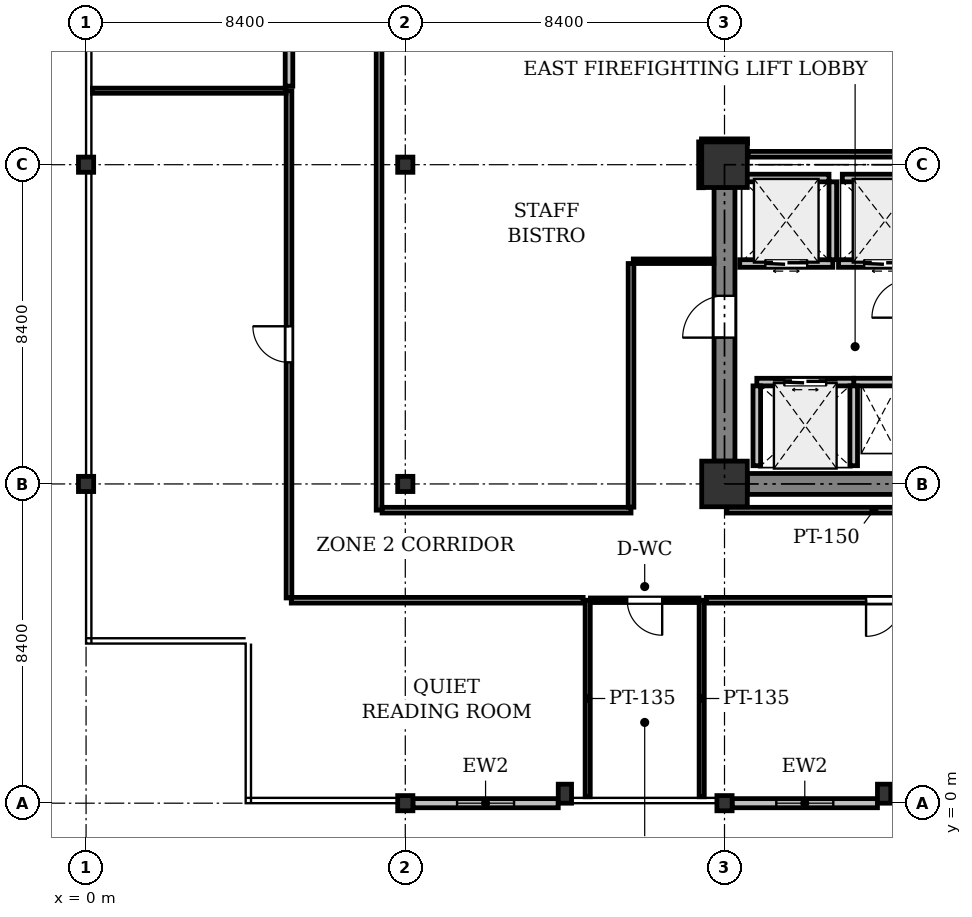
"""IFC4 building model, lengths in metres.
Left out: names, types, materials, properties, quantities, classifications, styles, units other than length and angle.
Written with IfcOpenShell. Run it as: python <this file> out.ifc"""

import sys

from ifc_helpers import new_model, si_unit, direction, frame, frame_2d, origin, origin_2d, place, context, subcontext, project, spatial, rectangle, i_section, extrude, element, fill, save


model = new_model("IFC4")
c1 = context("Model", 3, precision=1e-05, world=origin(), true_north=direction((0.0, 1.0)))
c2 = subcontext(c1, "Body", "Model", "MODEL_VIEW")
j1 = project(units=[si_unit("LENGTHUNIT", "METRE"), si_unit("PLANEANGLEUNIT", "RADIAN")], contexts=[c1])
p1 = place(None, origin())
s1 = spatial("IfcSite", under=j1, at=p1, CompositionType="ELEMENT")
p2 = place(p1, origin())
s2 = spatial("IfcBuilding", under=s1, at=p2, CompositionType="ELEMENT")
p3 = place(p2, frame((0.0, 0.0, 117.2)))
s3 = spatial("IfcBuildingStorey", under=s2, at=p3, CompositionType="ELEMENT", Elevation=117.2)
for number, where, z_axis, x_axis in (
    (1, (0.0, 8.4, 0.0), (0.0, 0.0, 1.0), (1.0, 0.0, 0.0)),
    (2, (0.0, 16.8, 0.0), (0.0, 0.0, 1.0), (1.0, 0.0, 0.0)),
    (3, (8.4, 0.0, 0.0), (0.0, 0.0, 1.0), (1.0, 0.0, 0.0)),
    (4, (8.4, 8.4, 0.0), (0.0, 0.0, 1.0), (1.0, 0.0, 0.0)),
    (5, (8.4, 16.8, 0.0), (0.0, 0.0, 1.0), (1.0, 0.0, 0.0)),
    (6, (16.8, 0.0, 0.0), (0.0, 0.0, 1.0), (1.0, 0.0, 0.0)),
):
    element("IfcColumn", number, at=place(p3, frame(where, z_axis=z_axis, x_axis=x_axis)), inside=s3, PredefinedType="COLUMN", context=c2, shape_type="SweptSolid", body=[
        extrude(i_section(OverallWidth=0.4, OverallDepth=0.4, WebThickness=0.025, FlangeThickness=0.04, at=origin_2d()), origin(), (0.0, 0.0, 1.0), 4.1),
    ])
for number, where, z_axis, x_axis in (
    (7, (16.8, 8.4, 0.0), (0.0, 0.0, 1.0), (1.0, 0.0, 0.0)),
    (8, (16.8, 16.8, 0.0), (0.0, 0.0, 1.0), (1.0, 0.0, 0.0)),
):
    element("IfcColumn", number, at=place(p3, frame(where, z_axis=z_axis, x_axis=x_axis)), inside=s3, PredefinedType="COLUMN", context=c2, shape_type="SweptSolid", body=[
        extrude(rectangle(XDim=1.2, YDim=1.2, at=origin_2d()), origin(), (0.0, 0.0, 1.0), 4.1),
    ])
for number, where, z_axis, x_axis in (
    (9, (12.6, 0.25, 0.0), (0.0, 0.0, 1.0), (1.0, 0.0, 0.0)),
    (10, (21.0, 0.25, 0.0), (0.0, 0.0, 1.0), (1.0, 0.0, 0.0)),
):
    element("IfcColumn", number, at=place(p3, frame(where, z_axis=z_axis, x_axis=x_axis)), inside=s3, PredefinedType="PILASTER", context=c2, shape_type="SweptSolid", body=[
        extrude(rectangle(XDim=0.35, YDim=0.5, at=origin_2d()), origin(), (0.0, 0.0, 1.0), 4.1),
    ])
p4 = place(p3, frame((20.825, 0.0, 0.0), z_axis=(0.0, 0.0, 1.0), x_axis=(-1.0, 0.0, 0.0)))
e11 = element("IfcWall", 11, at=p4, inside=s3, PredefinedType="STANDARD", context=c2, shape_type="SweptSolid", body=[
    extrude(rectangle(XDim=3.825, YDim=0.24, at=frame_2d((1.913, 0.0))), origin(), (0.0, 0.0, 1.0), 3.422),
])
p5 = place(p4, frame((1.163, 0.0, 0.9)))
e12 = element("IfcOpeningElement", 12, at=p5, cuts=e11, PredefinedType="OPENING", context=c2, shape_type="SweptSolid", body=[
    extrude(rectangle(XDim=1.5, YDim=1.6, at=frame_2d((0.75, 0.8))), frame((0.0, 0.13, 0.0), z_axis=(0.0, -1.0, 0.0), x_axis=(1.0, 0.0, 0.0)), (0.0, 0.0, 1.0), 0.26),
])
p6 = place(p3, frame((12.425, 0.0, 0.0), z_axis=(0.0, 0.0, 1.0), x_axis=(-1.0, 0.0, 0.0)))
e13 = element("IfcWall", 13, at=p6, inside=s3, PredefinedType="STANDARD", context=c2, shape_type="SweptSolid", body=[
    extrude(rectangle(XDim=3.825, YDim=0.24, at=frame_2d((1.913, 0.0))), origin(), (0.0, 0.0, 1.0), 3.422),
])
p7 = place(p6, frame((1.163, 0.0, 0.9)))
e14 = element("IfcOpeningElement", 14, at=p7, cuts=e13, PredefinedType="OPENING", context=c2, shape_type="SweptSolid", body=[
    extrude(rectangle(XDim=1.5, YDim=1.6, at=frame_2d((0.75, 0.8))), frame((0.0, 0.13, 0.0), z_axis=(0.0, -1.0, 0.0), x_axis=(1.0, 0.0, 0.0)), (0.0, 0.0, 1.0), 0.26),
])
p8 = place(p3, frame((17.4, 8.4, 0.0), z_axis=(0.0, 0.0, 1.0), x_axis=(1.0, 0.0, 0.0)))
e15 = element("IfcWall", 15, at=p8, inside=s3, PredefinedType="SHEAR", context=c2, shape_type="SweptSolid", body=[
    extrude(rectangle(XDim=7.2, YDim=0.55, at=frame_2d((3.6, 0.0))), origin(), (0.0, 0.0, 1.0), 3.825),
])
p9 = place(p3, frame((16.8, 9.0, 0.0), z_axis=(0.0, 0.0, 1.0), x_axis=(0.0, 1.0, 0.0)))
e16 = element("IfcWall", 16, at=p9, inside=s3, PredefinedType="SHEAR", context=c2, shape_type="SweptSolid", body=[
    extrude(rectangle(XDim=7.2, YDim=0.55, at=frame_2d((3.6, 0.0))), origin(), (0.0, 0.0, 1.0), 3.825),
])
p10 = place(p9, frame((3.25, 0.0, 0.0)))
e17 = element("IfcOpeningElement", 17, at=p10, cuts=e16, PredefinedType="OPENING", context=c2, shape_type="SweptSolid", body=[
    extrude(rectangle(XDim=1.1, YDim=2.15, at=frame_2d((0.55, 1.075))), frame((0.0, 0.285, 0.0), z_axis=(0.0, -1.0, 0.0), x_axis=(1.0, 0.0, 0.0)), (0.0, 0.0, 1.0), 0.57),
])
p11 = place(p3, frame((20.2, 11.08, 0.0), z_axis=(0.0, 0.0, 1.0), x_axis=(1.0, 0.0, 0.0)))
e18 = element("IfcWall", 18, at=p11, inside=s3, PredefinedType="PARTITIONING", context=c2, shape_type="SweptSolid", body=[
    extrude(rectangle(XDim=1.35, YDim=0.2, at=frame_2d((0.675, 0.0))), origin(), (0.0, 0.0, 1.0), 3.825),
])
p12 = place(p3, frame((17.65, 11.08, 0.0), z_axis=(0.0, 0.0, 1.0), x_axis=(1.0, 0.0, 0.0)))
e19 = element("IfcWall", 19, at=p12, inside=s3, PredefinedType="PARTITIONING", context=c2, shape_type="SweptSolid", body=[
    extrude(rectangle(XDim=2.55, YDim=0.2, at=frame_2d((1.275, 0.0))), origin(), (0.0, 0.0, 1.0), 3.825),
])
p13 = place(p12, frame((0.725, 0.0, 0.0)))
e20 = element("IfcOpeningElement", 20, at=p13, cuts=e19, PredefinedType="OPENING", context=c2, shape_type="SweptSolid", body=[
    extrude(rectangle(XDim=1.1, YDim=2.2, at=frame_2d((0.55, 1.1))), frame((0.0, 0.11, 0.0), z_axis=(0.0, -1.0, 0.0), x_axis=(1.0, 0.0, 0.0)), (0.0, 0.0, 1.0), 0.22),
])
for number, where, z_axis, x_axis in (
    (21, (20.2, 8.88, 0.0), (0.0, 0.0, 1.0), (0.0, 1.0, 0.0)),
    (22, (17.65, 8.88, 0.0), (0.0, 0.0, 1.0), (0.0, 1.0, 0.0)),
):
    element("IfcWall", number, at=place(p3, frame(where, z_axis=z_axis, x_axis=x_axis)), inside=s3, PredefinedType="PARTITIONING", context=c2, shape_type="SweptSolid", body=[
        extrude(rectangle(XDim=2.1, YDim=0.2, at=frame_2d((1.05, 0.0))), origin(), (0.0, 0.0, 1.0), 3.825),
    ])
p14 = place(p3, frame((17.2, 14.2, 0.0), z_axis=(0.0, 0.0, 1.0), x_axis=(1.0, 0.0, 0.0)))
e23 = element("IfcWall", 23, at=p14, inside=s3, PredefinedType="PARTITIONING", context=c2, shape_type="SweptSolid", body=[
    extrude(rectangle(XDim=2.45, YDim=0.2, at=frame_2d((1.225, 0.0))), origin(), (0.0, 0.0, 1.0), 3.825),
])
p15 = place(p14, frame((0.675, 0.0, 0.0)))
e24 = element("IfcOpeningElement", 24, at=p15, cuts=e23, PredefinedType="OPENING", context=c2, shape_type="SweptSolid", body=[
    extrude(rectangle(XDim=1.1, YDim=2.2, at=frame_2d((0.55, 1.1))), frame((0.0, 0.11, 0.0), z_axis=(0.0, -1.0, 0.0), x_axis=(1.0, 0.0, 0.0)), (0.0, 0.0, 1.0), 0.22),
])
p16 = place(p3, frame((19.65, 14.3, 0.0), z_axis=(0.0, 0.0, 1.0), x_axis=(0.0, 1.0, 0.0)))
e25 = element("IfcWall", 25, at=p16, inside=s3, PredefinedType="PARTITIONING", context=c2, shape_type="SweptSolid", body=[
    extrude(rectangle(XDim=2.05, YDim=0.2, at=frame_2d((1.025, 0.0))), origin(), (0.0, 0.0, 1.0), 3.825),
])
p17 = place(p3, frame((17.3, 16.45, 0.0), z_axis=(0.0, 0.0, 1.0), x_axis=(1.0, 0.0, 0.0)))
e26 = element("IfcWall", 26, at=p17, inside=s3, PredefinedType="PARTITIONING", context=c2, shape_type="SweptSolid", body=[
    extrude(rectangle(XDim=2.25, YDim=0.2, at=frame_2d((1.125, 0.0))), origin(), (0.0, 0.0, 1.0), 3.825),
])
p18 = place(p3, frame((19.8, 14.2, 0.0), z_axis=(0.0, 0.0, 1.0), x_axis=(1.0, 0.0, 0.0)))
e27 = element("IfcWall", 27, at=p18, inside=s3, PredefinedType="PARTITIONING", context=c2, shape_type="SweptSolid", body=[
    extrude(rectangle(XDim=2.45, YDim=0.2, at=frame_2d((1.225, 0.0))), origin(), (0.0, 0.0, 1.0), 3.825),
])
p19 = place(p18, frame((0.675, 0.0, 0.0)))
e28 = element("IfcOpeningElement", 28, at=p19, cuts=e27, PredefinedType="OPENING", context=c2, shape_type="SweptSolid", body=[
    extrude(rectangle(XDim=1.1, YDim=2.2, at=frame_2d((0.55, 1.1))), frame((0.0, 0.11, 0.0), z_axis=(0.0, -1.0, 0.0), x_axis=(1.0, 0.0, 0.0)), (0.0, 0.0, 1.0), 0.22),
])
p20 = place(p3, frame((19.9, 16.45, 0.0), z_axis=(0.0, 0.0, 1.0), x_axis=(1.0, 0.0, 0.0)))
e29 = element("IfcWall", 29, at=p20, inside=s3, PredefinedType="PARTITIONING", context=c2, shape_type="SweptSolid", body=[
    extrude(rectangle(XDim=2.25, YDim=0.2, at=frame_2d((1.125, 0.0))), origin(), (0.0, 0.0, 1.0), 3.825),
])
for number, where, z_axis, x_axis in (
    (30, (13.2, 5.34, 0.0), (0.0, 0.0, 1.0), (0.0, -1.0, 0.0)),
    (31, (16.2, 0.169, 0.0), (0.0, 0.0, 1.0), (0.0, 1.0, 0.0)),
):
    element("IfcWall", number, at=place(p3, frame(where, z_axis=z_axis, x_axis=x_axis)), inside=s3, PredefinedType="PARTITIONING", context=c2, shape_type="SweptSolid", body=[
        extrude(rectangle(XDim=5.171, YDim=0.135, at=frame_2d((2.585, 0.0))), origin(), (0.0, 0.0, 1.0), 3.825),
    ])
p21 = place(p3, frame((16.128, 5.34, 0.0), z_axis=(0.0, 0.0, 1.0), x_axis=(-1.0, 0.0, 0.0)))
e32 = element("IfcWall", 32, at=p21, inside=s3, PredefinedType="PARTITIONING", context=c2, shape_type="SweptSolid", body=[
    extrude(rectangle(XDim=2.857, YDim=0.12, at=frame_2d((1.428, 0.0))), origin(), (0.0, 0.0, 1.0), 3.825),
])
p22 = place(p21, frame((0.969, 0.0, 0.0)))
e33 = element("IfcOpeningElement", 33, at=p22, cuts=e32, PredefinedType="OPENING", context=c2, shape_type="SweptSolid", body=[
    extrude(rectangle(XDim=0.92, YDim=2.1, at=frame_2d((0.46, 1.05))), frame((0.0, 0.07, 0.0), z_axis=(0.0, -1.0, 0.0), x_axis=(1.0, 0.0, 0.0)), (0.0, 0.0, 1.0), 0.14),
])
p23 = place(p3, frame((16.86, 7.71, 0.0), z_axis=(0.0, 0.0, 1.0), x_axis=(1.0, 0.0, 0.0)))
e34 = element("IfcWall", 34, at=p23, inside=s3, PredefinedType="PARTITIONING", context=c2, shape_type="SweptSolid", body=[
    extrude(rectangle(XDim=7.74, YDim=0.15, at=frame_2d((3.87, 0.0))), origin(), (0.0, 0.0, 1.0), 3.297),
])
p24 = place(p3, frame((25.68, 5.34, 0.0), z_axis=(0.0, 0.0, 1.0), x_axis=(-1.0, 0.0, 0.0)))
e35 = element("IfcWall", 35, at=p24, inside=s3, PredefinedType="PARTITIONING", context=c2, shape_type="SweptSolid", body=[
    extrude(rectangle(XDim=9.36, YDim=0.15, at=frame_2d((4.68, 0.0))), origin(), (0.0, 0.0, 1.0), 3.297),
])
p25 = place(p24, frame((4.205, 0.0, 0.0)))
e36 = element("IfcOpeningElement", 36, at=p25, cuts=e35, PredefinedType="OPENING", context=c2, shape_type="SweptSolid", body=[
    extrude(rectangle(XDim=0.95, YDim=2.15, at=frame_2d((0.475, 1.075))), frame((0.0, 0.085, 0.0), z_axis=(0.0, -1.0, 0.0), x_axis=(1.0, 0.0, 0.0)), (0.0, 0.0, 1.0), 0.17),
])
p26 = place(p3, frame((5.34, 5.4, 0.0), z_axis=(0.0, 0.0, 1.0), x_axis=(0.0, 1.0, 0.0)))
e37 = element("IfcWall", 37, at=p26, inside=s3, PredefinedType="PARTITIONING", context=c2, shape_type="SweptSolid", body=[
    extrude(rectangle(XDim=13.347, YDim=0.15, at=frame_2d((6.674, 0.0))), origin(), (0.0, 0.0, 1.0), 3.292),
])
p27 = place(p26, frame((6.198, 0.0, 0.0)))
e38 = element("IfcOpeningElement", 38, at=p27, cuts=e37, PredefinedType="OPENING", context=c2, shape_type="SweptSolid", body=[
    extrude(rectangle(XDim=0.95, YDim=2.15, at=frame_2d((0.475, 1.075))), frame((0.0, 0.085, 0.0), z_axis=(0.0, -1.0, 0.0), x_axis=(1.0, 0.0, 0.0)), (0.0, 0.0, 1.0), 0.17),
])
p28 = place(p3, frame((5.261, 18.747, 0.0), z_axis=(0.0, 0.0, 1.0), x_axis=(-1.0, 0.0, 0.0)))
e39 = element("IfcWall", 39, at=p28, inside=s3, PredefinedType="PARTITIONING", context=c2, shape_type="SweptSolid", body=[
    extrude(rectangle(XDim=5.092, YDim=0.135, at=frame_2d((2.546, 0.0))), origin(), (0.0, 0.0, 1.0), 3.469),
])
p29 = place(p3, frame((13.08, 5.34, 0.0), z_axis=(0.0, 0.0, 1.0), x_axis=(-1.0, 0.0, 0.0)))
e40 = element("IfcWall", 40, at=p29, inside=s3, PredefinedType="PARTITIONING", context=c2, shape_type="SweptSolid", body=[
    extrude(rectangle(XDim=7.68, YDim=0.15, at=frame_2d((3.84, 0.0))), origin(), (0.0, 0.0, 1.0), 3.297),
])
p30 = place(p3, frame((14.4, 14.26, 0.0), z_axis=(0.0, 0.0, 1.0), x_axis=(1.0, 0.0, 0.0)))
e41 = element("IfcWall", 41, at=p30, inside=s3, PredefinedType="PARTITIONING", context=c2, shape_type="SweptSolid", body=[
    extrude(rectangle(XDim=2.121, YDim=0.12, at=frame_2d((1.061, 0.0))), origin(), (0.0, 0.0, 1.0), 3.825),
])
p31 = place(p3, frame((16.181, 16.194, 0.0), z_axis=(0.0, 0.0, 1.0), x_axis=(-0.000809880277, 0.999999672047, 0.0)))
e42 = element("IfcWall", 42, at=p31, inside=s3, PredefinedType="PARTITIONING", context=c2, shape_type="SweptSolid", body=[
    extrude(rectangle(XDim=1.206, YDim=0.12, at=frame_2d((0.603, 0.0))), origin(), (0.0, 0.0, 1.0), 3.292),
])
p32 = place(p3, frame((16.194, 17.419, 0.0), z_axis=(0.0, 0.0, 1.0), x_axis=(1.0, 0.0, 0.0)))
e43 = element("IfcWall", 43, at=p32, inside=s3, PredefinedType="PARTITIONING", context=c2, shape_type="SweptSolid", body=[
    extrude(rectangle(XDim=1.212, YDim=0.12, at=frame_2d((0.606, 0.0))), origin(), (0.0, 0.0, 1.0), 3.297),
])
p33 = place(p3, frame((17.42, 17.075, 0.0), z_axis=(0.0, 0.0, 1.0), x_axis=(1.0, 0.0, 0.0)))
e44 = element("IfcWall", 44, at=p33, inside=s3, PredefinedType="PARTITIONING", context=c2, shape_type="SweptSolid", body=[
    extrude(rectangle(XDim=7.16, YDim=0.15, at=frame_2d((3.58, 0.0))), origin(), (0.0, 0.0, 1.0), 3.469),
])
p34 = place(p3, frame((7.71, 22.711, 0.0), z_axis=(0.0, 0.0, 1.0), x_axis=(0.0, -1.0, 0.0)))
e45 = element("IfcWall", 45, at=p34, inside=s3, PredefinedType="PARTITIONING", context=c2, shape_type="SweptSolid", body=[
    extrude(rectangle(XDim=15.001, YDim=0.15, at=frame_2d((7.5, 0.0))), origin(), (0.0, 0.0, 1.0), 3.292),
])
p35 = place(p3, frame((7.789, 7.71, 0.0), z_axis=(0.0, 0.0, 1.0), x_axis=(1.0, 0.0, 0.0)))
e46 = element("IfcWall", 46, at=p35, inside=s3, PredefinedType="PARTITIONING", context=c2, shape_type="SweptSolid", body=[
    extrude(rectangle(XDim=6.551, YDim=0.15, at=frame_2d((3.275, 0.0))), origin(), (0.0, 0.0, 1.0), 3.297),
])
p36 = place(p3, frame((14.34, 7.789, 0.0), z_axis=(0.0, 0.0, 1.0), x_axis=(0.0, 1.0, 0.0)))
e47 = element("IfcWall", 47, at=p36, inside=s3, PredefinedType="PARTITIONING", context=c2, shape_type="SweptSolid", body=[
    extrude(rectangle(XDim=6.411, YDim=0.15, at=frame_2d((3.206, 0.0))), origin(), (0.0, 0.0, 1.0), 3.292),
])
p37 = place(p3, frame((5.34, 18.867, 0.0), z_axis=(0.0, 0.0, 1.0), x_axis=(0.0, 1.0, 0.0)))
e48 = element("IfcWall", 48, at=p37, inside=s3, PredefinedType="PARTITIONING", context=c2, shape_type="SweptSolid", body=[
    extrude(rectangle(XDim=26.333, YDim=0.2, at=frame_2d((13.167, 0.0))), origin(), (0.0, 0.0, 1.0), 3.292),
])
p38 = place(p37, frame((12.667, 0.0, 0.0)))
e49 = element("IfcOpeningElement", 49, at=p38, cuts=e48, PredefinedType="OPENING", context=c2, shape_type="SweptSolid", body=[
    extrude(rectangle(XDim=1.0, YDim=2.15, at=frame_2d((0.5, 1.075))), frame((0.0, 0.11, 0.0), z_axis=(0.0, -1.0, 0.0), x_axis=(1.0, 0.0, 0.0)), (0.0, 0.0, 1.0), 0.22),
])
p39 = place(p5, origin())
e50 = element("IfcWindow", 50, at=p39, inside=s3, PartitioningType="SINGLE_PANEL", PredefinedType="WINDOW", context=c2, shape_type="SweptSolid", body=[
    extrude(rectangle(XDim=1.5, YDim=1.6, at=frame_2d((0.75, 0.8))), frame((0.0, 0.03, 0.0), z_axis=(0.0, -1.0, 0.0), x_axis=(1.0, 0.0, 0.0)), (0.0, 0.0, 1.0), 0.06),
])
fill(e12, e50)
p40 = place(p7, origin())
e51 = element("IfcWindow", 51, at=p40, inside=s3, PartitioningType="SINGLE_PANEL", PredefinedType="WINDOW", context=c2, shape_type="SweptSolid", body=[
    extrude(rectangle(XDim=1.5, YDim=1.6, at=frame_2d((0.75, 0.8))), frame((0.0, 0.03, 0.0), z_axis=(0.0, -1.0, 0.0), x_axis=(1.0, 0.0, 0.0)), (0.0, 0.0, 1.0), 0.06),
])
fill(e14, e51)
p41 = place(p10, origin())
e52 = element("IfcDoor", 52, at=p41, inside=s3, OperationType="SINGLE_SWING_LEFT", PredefinedType="DOOR", context=c2, shape_type="SweptSolid", body=[
    extrude(rectangle(XDim=1.1, YDim=2.15, at=frame_2d((0.55, 1.075))), frame((0.0, 0.025, 0.0), z_axis=(0.0, -1.0, 0.0), x_axis=(1.0, 0.0, 0.0)), (0.0, 0.0, 1.0), 0.05),
])
fill(e17, e52)
p42 = place(p13, origin())
e53 = element("IfcDoor", 53, at=p42, inside=s3, OperationType="DOUBLE_DOOR_SLIDING", PredefinedType="DOOR", context=c2, shape_type="SweptSolid", body=[
    extrude(rectangle(XDim=1.1, YDim=2.2, at=frame_2d((0.55, 1.1))), frame((0.0, 0.025, 0.0), z_axis=(0.0, -1.0, 0.0), x_axis=(1.0, 0.0, 0.0)), (0.0, 0.0, 1.0), 0.05),
])
fill(e20, e53)
p43 = place(p15, origin())
e54 = element("IfcDoor", 54, at=p43, inside=s3, OperationType="DOUBLE_DOOR_SLIDING", PredefinedType="DOOR", context=c2, shape_type="SweptSolid", body=[
    extrude(rectangle(XDim=1.1, YDim=2.2, at=frame_2d((0.55, 1.1))), frame((0.0, 0.025, 0.0), z_axis=(0.0, -1.0, 0.0), x_axis=(1.0, 0.0, 0.0)), (0.0, 0.0, 1.0), 0.05),
])
fill(e24, e54)
p44 = place(p19, origin())
e55 = element("IfcDoor", 55, at=p44, inside=s3, OperationType="DOUBLE_DOOR_SLIDING", PredefinedType="DOOR", context=c2, shape_type="SweptSolid", body=[
    extrude(rectangle(XDim=1.1, YDim=2.2, at=frame_2d((0.55, 1.1))), frame((0.0, 0.025, 0.0), z_axis=(0.0, -1.0, 0.0), x_axis=(1.0, 0.0, 0.0)), (0.0, 0.0, 1.0), 0.05),
])
fill(e28, e55)
p45 = place(p22, origin())
e56 = element("IfcDoor", 56, at=p45, inside=s3, OperationType="SINGLE_SWING_LEFT", PredefinedType="DOOR", context=c2, shape_type="SweptSolid", body=[
    extrude(rectangle(XDim=0.92, YDim=2.1, at=frame_2d((0.46, 1.05))), frame((0.0, 0.025, 0.0), z_axis=(0.0, -1.0, 0.0), x_axis=(1.0, 0.0, 0.0)), (0.0, 0.0, 1.0), 0.05),
])
fill(e33, e56)
p46 = place(p25, origin())
e57 = element("IfcDoor", 57, at=p46, inside=s3, OperationType="SINGLE_SWING_RIGHT", PredefinedType="DOOR", context=c2, shape_type="SweptSolid", body=[
    extrude(rectangle(XDim=0.95, YDim=2.15, at=frame_2d((0.475, 1.075))), frame((0.0, 0.025, 0.0), z_axis=(0.0, -1.0, 0.0), x_axis=(1.0, 0.0, 0.0)), (0.0, 0.0, 1.0), 0.05),
])
fill(e36, e57)
p47 = place(p27, origin())
e58 = element("IfcDoor", 58, at=p47, inside=s3, OperationType="SINGLE_SWING_RIGHT", PredefinedType="DOOR", context=c2, shape_type="SweptSolid", body=[
    extrude(rectangle(XDim=0.95, YDim=2.15, at=frame_2d((0.475, 1.075))), frame((0.0, 0.025, 0.0), z_axis=(0.0, -1.0, 0.0), x_axis=(1.0, 0.0, 0.0)), (0.0, 0.0, 1.0), 0.05),
])
fill(e38, e58)
save(model, sys.argv[1])
